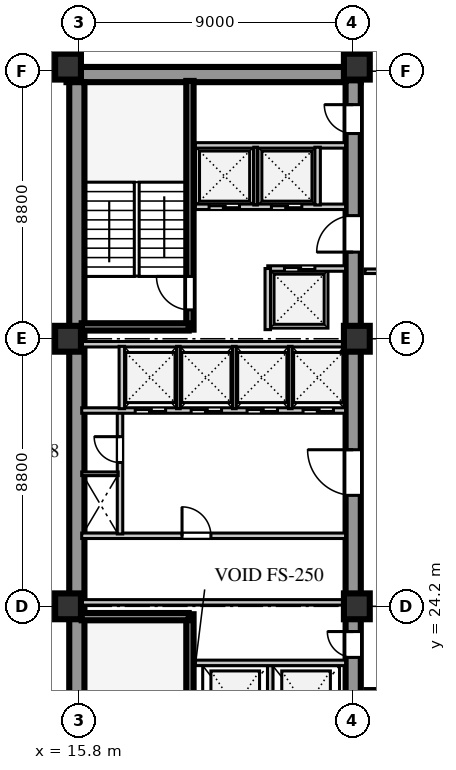
"""IFC4 building model, lengths in metres.
Left out: names, types, materials, properties, quantities, classifications, styles, units other than length and angle.
Written with IfcOpenShell. Run it as: python <this file> out.ifc"""

import sys

from ifc_helpers import new_model, si_unit, direction, frame, frame_2d, origin, origin_2d, place, context, subcontext, project, spatial, rectangle, extrude, element, fill, save


model = new_model("IFC4")
c1 = context("Model", 3, precision=1e-05, world=origin(), true_north=direction((0.0, 1.0)))
c2 = subcontext(c1, "Body", "Model", "MODEL_VIEW")
j1 = project(units=[si_unit("LENGTHUNIT", "METRE"), si_unit("PLANEANGLEUNIT", "RADIAN")], contexts=[c1])
p1 = place(None, origin())
s1 = spatial("IfcSite", under=j1, at=p1, CompositionType="ELEMENT")
p2 = place(p1, origin())
s2 = spatial("IfcBuilding", under=s1, at=p2, CompositionType="ELEMENT")
p3 = place(p2, frame((0.0, 0.0, 127.1)))
s3 = spatial("IfcBuildingStorey", under=s2, at=p3, CompositionType="ELEMENT", Elevation=127.1)
p4 = place(p3, frame((15.4, 41.69, 0.0), z_axis=(0.0, 0.0, 1.0), x_axis=(1.0, 0.0, 0.0)))
e1 = element("IfcWall", 1, at=p4, inside=s3, PredefinedType="SHEAR", context=c2, shape_type="SweptSolid", body=[
    extrude(rectangle(XDim=9.68, YDim=0.5, at=frame_2d((4.84, 0.0))), origin(), (0.0, 0.0, 1.0), 3.6),
])
p5 = place(p3, frame((15.74, 15.81, 0.0), z_axis=(0.0, 0.0, 1.0), x_axis=(0.0, 1.0, 0.0)))
e2 = element("IfcWall", 2, at=p5, inside=s3, PredefinedType="SHEAR", context=c2, shape_type="SweptSolid", body=[
    extrude(rectangle(XDim=25.63, YDim=0.5, at=frame_2d((12.815, 0.0))), origin(), (0.0, 0.0, 1.0), 3.6),
])
p6 = place(p3, frame((24.83, 15.74, 0.0), z_axis=(0.0, 0.0, 1.0), x_axis=(0.0, 1.0, 0.0)))
e3 = element("IfcWall", 3, at=p6, inside=s3, PredefinedType="SHEAR", context=c2, shape_type="SweptSolid", body=[
    extrude(rectangle(XDim=25.76, YDim=0.5, at=frame_2d((12.88, 0.0))), origin(), (0.0, 0.0, 1.0), 3.6),
])
p7 = place(p6, frame((1.61, 0.0, 0.0)))
e4 = element("IfcOpeningElement", 4, at=p7, cuts=e3, PredefinedType="OPENING", context=c2, shape_type="SweptSolid", body=[
    extrude(rectangle(XDim=1.2, YDim=2.1, at=frame_2d((0.6, 1.05))), frame((0.0, 0.26, 0.0), z_axis=(0.0, -1.0, 0.0), x_axis=(1.0, 0.0, 0.0)), (0.0, 0.0, 1.0), 0.52),
])
p8 = place(p6, frame((6.78, 0.0, 0.0)))
e5 = element("IfcOpeningElement", 5, at=p8, cuts=e3, PredefinedType="OPENING", context=c2, shape_type="SweptSolid", body=[
    extrude(rectangle(XDim=0.85, YDim=2.06, at=frame_2d((0.425, 1.03))), frame((0.0, 0.26, 0.0), z_axis=(0.0, -1.0, 0.0), x_axis=(1.0, 0.0, 0.0)), (0.0, 0.0, 1.0), 0.52),
])
p9 = place(p6, frame((12.11, 0.0, 0.0)))
e6 = element("IfcOpeningElement", 6, at=p9, cuts=e3, PredefinedType="OPENING", context=c2, shape_type="SweptSolid", body=[
    extrude(rectangle(XDim=1.5, YDim=2.12, at=frame_2d((0.75, 1.06))), frame((0.0, 0.26, 0.0), z_axis=(0.0, -1.0, 0.0), x_axis=(1.0, 0.0, 0.0)), (0.0, 0.0, 1.0), 0.52),
])
p10 = place(p6, frame((20.11, 0.0, 0.0)))
e7 = element("IfcOpeningElement", 7, at=p10, cuts=e3, PredefinedType="OPENING", context=c2, shape_type="SweptSolid", body=[
    extrude(rectangle(XDim=1.2, YDim=2.12, at=frame_2d((0.6, 1.06))), frame((0.0, 0.26, 0.0), z_axis=(0.0, -1.0, 0.0), x_axis=(1.0, 0.0, 0.0)), (0.0, 0.0, 1.0), 0.52),
])
p11 = place(p6, frame((24.01, 0.0, 0.0)))
e8 = element("IfcOpeningElement", 8, at=p11, cuts=e3, PredefinedType="OPENING", context=c2, shape_type="SweptSolid", body=[
    extrude(rectangle(XDim=0.95, YDim=2.1, at=frame_2d((0.475, 1.05))), frame((0.0, 0.26, 0.0), z_axis=(0.0, -1.0, 0.0), x_axis=(1.0, 0.0, 0.0)), (0.0, 0.0, 1.0), 0.52),
])
for number, where, z_axis, x_axis in (
    (9, (15.45, 24.2, 0.0), (0.0, 0.0, 1.0), (1.0, 0.0, 0.0)),
    (10, (15.45, 33.0, 0.0), (0.0, 0.0, 1.0), (1.0, 0.0, 0.0)),
    (11, (15.45, 41.95, 0.0), (0.0, 0.0, 1.0), (1.0, 0.0, 0.0)),
    (12, (24.95, 24.2, 0.0), (0.0, 0.0, 1.0), (1.0, 0.0, 0.0)),
    (13, (24.95, 33.0, 0.0), (0.0, 0.0, 1.0), (1.0, 0.0, 0.0)),
    (14, (24.95, 41.95, 0.0), (0.0, 0.0, 1.0), (1.0, 0.0, 0.0)),
):
    element("IfcColumn", number, at=place(p3, frame(where, z_axis=z_axis, x_axis=x_axis)), inside=s3, PredefinedType="COLUMN", context=c2, shape_type="SweptSolid", body=[
        extrude(rectangle(XDim=0.85, YDim=0.85, at=origin_2d()), origin(), (0.0, 0.0, 1.0), 3.6),
    ])
p12 = place(p3, frame((19.46, 15.74, 0.0), z_axis=(0.0, 0.0, 1.0), x_axis=(0.0, 1.0, 0.0)))
e15 = element("IfcWall", 15, at=p12, inside=s3, PredefinedType="SHEAR", context=c2, shape_type="SweptSolid", body=[
    extrude(rectangle(XDim=8.2, YDim=0.24, at=frame_2d((4.1, 0.0))), origin(), (0.0, 0.0, 1.0), 3.85),
])
p13 = place(p12, frame((0.45, 0.0, 0.0)))
e16 = element("IfcOpeningElement", 16, at=p13, cuts=e15, PredefinedType="OPENING", context=c2, shape_type="SweptSolid", body=[
    extrude(rectangle(XDim=1.1, YDim=2.1, at=frame_2d((0.55, 1.05))), frame((0.0, 0.13, 0.0), z_axis=(0.0, -1.0, 0.0), x_axis=(1.0, 0.0, 0.0)), (0.0, 0.0, 1.0), 0.26),
])
p14 = place(p3, frame((15.9, 23.86, 0.0), z_axis=(0.0, 0.0, 1.0), x_axis=(1.0, 0.0, 0.0)))
e17 = element("IfcWall", 17, at=p14, inside=s3, PredefinedType="SHEAR", context=c2, shape_type="SweptSolid", body=[
    extrude(rectangle(XDim=3.52, YDim=0.24, at=frame_2d((1.76, 0.0))), origin(), (0.0, 0.0, 1.0), 3.85),
])
p15 = place(p3, frame((22.1, 19.51, 0.0), z_axis=(0.0, 0.0, 1.0), x_axis=(0.0, 1.0, 0.0)))
e18 = element("IfcWall", 18, at=p15, inside=s3, PredefinedType="SOLIDWALL", context=c2, shape_type="SweptSolid", body=[
    extrude(rectangle(XDim=2.74, YDim=0.18, at=frame_2d((1.37, 0.0))), origin(), (0.0, 0.0, 1.0), 3.6),
])
p16 = place(p3, frame((19.64, 22.34, 0.0), z_axis=(0.0, 0.0, 1.0), x_axis=(1.0, 0.0, 0.0)))
e19 = element("IfcWall", 19, at=p16, inside=s3, PredefinedType="SOLIDWALL", context=c2, shape_type="SweptSolid", body=[
    extrude(rectangle(XDim=4.94, YDim=0.18, at=frame_2d((2.47, 0.0))), origin(), (0.0, 0.0, 1.0), 3.6),
])
p17 = place(p3, frame((15.9, 26.52, 0.0), z_axis=(0.0, 0.0, 1.0), x_axis=(1.0, 0.0, 0.0)))
e20 = element("IfcWall", 20, at=p17, inside=s3, PredefinedType="SOLIDWALL", context=c2, shape_type="SweptSolid", body=[
    extrude(rectangle(XDim=8.68, YDim=0.18, at=frame_2d((4.34, 0.0))), origin(), (0.0, 0.0, 1.0), 3.6),
])
p18 = place(p17, frame((3.3, 0.0, 0.0)))
e21 = element("IfcOpeningElement", 21, at=p18, cuts=e20, PredefinedType="OPENING", context=c2, shape_type="SweptSolid", body=[
    extrude(rectangle(XDim=0.95, YDim=2.1, at=frame_2d((0.475, 1.05))), frame((0.0, 0.1, 0.0), z_axis=(0.0, -1.0, 0.0), x_axis=(1.0, 0.0, 0.0)), (0.0, 0.0, 1.0), 0.2),
])
p19 = place(p3, frame((15.9, 24.33, 0.0), z_axis=(0.0, 0.0, 1.0), x_axis=(1.0, 0.0, 0.0)))
e22 = element("IfcWall", 22, at=p19, inside=s3, PredefinedType="SOLIDWALL", context=c2, shape_type="SweptSolid", body=[
    extrude(rectangle(XDim=8.68, YDim=0.18, at=frame_2d((4.34, 0.0))), origin(), (0.0, 0.0, 1.0), 2.95),
])
p20 = place(p3, frame((17.16, 26.58, 0.0), z_axis=(0.0, 0.0, 1.0), x_axis=(0.0, 1.0, 0.0)))
e23 = element("IfcWall", 23, at=p20, inside=s3, PredefinedType="SOLIDWALL", context=c2, shape_type="SweptSolid", body=[
    extrude(rectangle(XDim=4.02, YDim=0.18, at=frame_2d((2.01, 0.0))), origin(), (0.0, 0.0, 1.0), 3.6),
])
p21 = place(p20, frame((2.35, 0.0, 0.0)))
e24 = element("IfcOpeningElement", 24, at=p21, cuts=e23, PredefinedType="OPENING", context=c2, shape_type="SweptSolid", body=[
    extrude(rectangle(XDim=0.85, YDim=2.06, at=frame_2d((0.425, 1.03))), frame((0.0, 0.1, 0.0), z_axis=(0.0, -1.0, 0.0), x_axis=(1.0, 0.0, 0.0)), (0.0, 0.0, 1.0), 0.2),
])
p22 = place(p3, frame((15.9, 28.56, 0.0), z_axis=(0.0, 0.0, 1.0), x_axis=(1.0, 0.0, 0.0)))
e25 = element("IfcWall", 25, at=p22, inside=s3, PredefinedType="PARTITIONING", context=c2, shape_type="SweptSolid", body=[
    extrude(rectangle(XDim=1.2, YDim=0.12, at=frame_2d((0.6, 0.0))), origin(), (0.0, 0.0, 1.0), 3.6),
])
p23 = place(p3, frame((15.9, 30.64, 0.0), z_axis=(0.0, 0.0, 1.0), x_axis=(1.0, 0.0, 0.0)))
e26 = element("IfcWall", 26, at=p23, inside=s3, PredefinedType="SOLIDWALL", context=c2, shape_type="SweptSolid", body=[
    extrude(rectangle(XDim=8.68, YDim=0.18, at=frame_2d((4.34, 0.0))), origin(), (0.0, 0.0, 1.0), 3.6),
])
p24 = place(p23, frame((1.76, 0.0, 0.0)))
e27 = element("IfcOpeningElement", 27, at=p24, cuts=e26, PredefinedType="OPENING", context=c2, shape_type="SweptSolid", body=[
    extrude(rectangle(XDim=1.0, YDim=2.1, at=frame_2d((0.5, 1.05))), frame((0.0, 0.1, 0.0), z_axis=(0.0, -1.0, 0.0), x_axis=(1.0, 0.0, 0.0)), (0.0, 0.0, 1.0), 0.2),
])
p25 = place(p23, frame((3.6, 0.0, 0.0)))
e28 = element("IfcOpeningElement", 28, at=p25, cuts=e26, PredefinedType="OPENING", context=c2, shape_type="SweptSolid", body=[
    extrude(rectangle(XDim=1.0, YDim=2.1, at=frame_2d((0.5, 1.05))), frame((0.0, 0.1, 0.0), z_axis=(0.0, -1.0, 0.0), x_axis=(1.0, 0.0, 0.0)), (0.0, 0.0, 1.0), 0.2),
])
p26 = place(p23, frame((5.44, 0.0, 0.0)))
e29 = element("IfcOpeningElement", 29, at=p26, cuts=e26, PredefinedType="OPENING", context=c2, shape_type="SweptSolid", body=[
    extrude(rectangle(XDim=1.0, YDim=2.1, at=frame_2d((0.5, 1.05))), frame((0.0, 0.1, 0.0), z_axis=(0.0, -1.0, 0.0), x_axis=(1.0, 0.0, 0.0)), (0.0, 0.0, 1.0), 0.2),
])
p27 = place(p23, frame((7.28, 0.0, 0.0)))
e30 = element("IfcOpeningElement", 30, at=p27, cuts=e26, PredefinedType="OPENING", context=c2, shape_type="SweptSolid", body=[
    extrude(rectangle(XDim=1.0, YDim=2.1, at=frame_2d((0.5, 1.05))), frame((0.0, 0.1, 0.0), z_axis=(0.0, -1.0, 0.0), x_axis=(1.0, 0.0, 0.0)), (0.0, 0.0, 1.0), 0.2),
])
p28 = place(p3, frame((15.9, 32.82, 0.0), z_axis=(0.0, 0.0, 1.0), x_axis=(1.0, 0.0, 0.0)))
e31 = element("IfcWall", 31, at=p28, inside=s3, PredefinedType="SOLIDWALL", context=c2, shape_type="SweptSolid", body=[
    extrude(rectangle(XDim=8.68, YDim=0.18, at=frame_2d((4.34, 0.0))), origin(), (0.0, 0.0, 1.0), 2.95),
])
p29 = place(p3, frame((17.22, 30.7, 0.0), z_axis=(0.0, 0.0, 1.0), x_axis=(0.0, 1.0, 0.0)))
e32 = element("IfcWall", 32, at=p29, inside=s3, PredefinedType="SOLIDWALL", context=c2, shape_type="SweptSolid", body=[
    extrude(rectangle(XDim=2.05, YDim=0.18, at=frame_2d((1.025, 0.0))), origin(), (0.0, 0.0, 1.0), 3.6),
])
for number, where, z_axis, x_axis in (
    (33, (19.08, 30.7, 0.0), (0.0, 0.0, 1.0), (0.0, 1.0, 0.0)),
    (34, (20.92, 30.7, 0.0), (0.0, 0.0, 1.0), (0.0, 1.0, 0.0)),
    (35, (22.76, 30.7, 0.0), (0.0, 0.0, 1.0), (0.0, 1.0, 0.0)),
):
    element("IfcWall", number, at=place(p3, frame(where, z_axis=z_axis, x_axis=x_axis)), inside=s3, PredefinedType="PARTITIONING", context=c2, shape_type="SweptSolid", body=[
        extrude(rectangle(XDim=2.05, YDim=0.12, at=frame_2d((1.025, 0.0))), origin(), (0.0, 0.0, 1.0), 3.6),
    ])
p30 = place(p3, frame((19.46, 33.3, 0.0), z_axis=(0.0, 0.0, 1.0), x_axis=(0.0, 1.0, 0.0)))
e36 = element("IfcWall", 36, at=p30, inside=s3, PredefinedType="SHEAR", context=c2, shape_type="SweptSolid", body=[
    extrude(rectangle(XDim=8.18, YDim=0.24, at=frame_2d((4.09, 0.0))), origin(), (0.0, 0.0, 1.0), 3.85),
])
p31 = place(p30, frame((0.65, 0.0, 0.0)))
e37 = element("IfcOpeningElement", 37, at=p31, cuts=e36, PredefinedType="OPENING", context=c2, shape_type="SweptSolid", body=[
    extrude(rectangle(XDim=1.1, YDim=2.1, at=frame_2d((0.55, 1.05))), frame((0.0, 0.13, 0.0), z_axis=(0.0, -1.0, 0.0), x_axis=(1.0, 0.0, 0.0)), (0.0, 0.0, 1.0), 0.26),
])
p32 = place(p3, frame((15.9, 33.39, 0.0), z_axis=(0.0, 0.0, 1.0), x_axis=(1.0, 0.0, 0.0)))
e38 = element("IfcWall", 38, at=p32, inside=s3, PredefinedType="SHEAR", context=c2, shape_type="SweptSolid", body=[
    extrude(rectangle(XDim=3.52, YDim=0.24, at=frame_2d((1.76, 0.0))), origin(), (0.0, 0.0, 1.0), 3.85),
])
p33 = place(p3, frame((22.02, 35.31, 0.0), z_axis=(0.0, 0.0, 1.0), x_axis=(1.0, 0.0, 0.0)))
e39 = element("IfcWall", 39, at=p33, inside=s3, PredefinedType="SOLIDWALL", context=c2, shape_type="SweptSolid", body=[
    extrude(rectangle(XDim=2.56, YDim=0.18, at=frame_2d((1.28, 0.0))), origin(), (0.0, 0.0, 1.0), 3.6),
])
p34 = place(p33, frame((0.55, 0.0, 0.0)))
e40 = element("IfcOpeningElement", 40, at=p34, cuts=e39, PredefinedType="OPENING", context=c2, shape_type="SweptSolid", body=[
    extrude(rectangle(XDim=1.0, YDim=2.1, at=frame_2d((0.5, 1.05))), frame((0.0, 0.1, 0.0), z_axis=(0.0, -1.0, 0.0), x_axis=(1.0, 0.0, 0.0)), (0.0, 0.0, 1.0), 0.2),
])
p35 = place(p3, frame((22.02, 33.3, 0.0), z_axis=(0.0, 0.0, 1.0), x_axis=(0.0, 1.0, 0.0)))
e41 = element("IfcWall", 41, at=p35, inside=s3, PredefinedType="SOLIDWALL", context=c2, shape_type="SweptSolid", body=[
    extrude(rectangle(XDim=2.01, YDim=0.18, at=frame_2d((1.005, 0.0))), origin(), (0.0, 0.0, 1.0), 3.6),
])
p36 = place(p3, frame((19.64, 37.34, 0.0), z_axis=(0.0, 0.0, 1.0), x_axis=(1.0, 0.0, 0.0)))
e42 = element("IfcWall", 42, at=p36, inside=s3, PredefinedType="SOLIDWALL", context=c2, shape_type="SweptSolid", body=[
    extrude(rectangle(XDim=4.94, YDim=0.18, at=frame_2d((2.47, 0.0))), origin(), (0.0, 0.0, 1.0), 3.6),
])
p37 = place(p36, frame((0.45, 0.0, 0.0)))
e43 = element("IfcOpeningElement", 43, at=p37, cuts=e42, PredefinedType="OPENING", context=c2, shape_type="SweptSolid", body=[
    extrude(rectangle(XDim=1.0, YDim=2.1, at=frame_2d((0.5, 1.05))), frame((0.0, 0.1, 0.0), z_axis=(0.0, -1.0, 0.0), x_axis=(1.0, 0.0, 0.0)), (0.0, 0.0, 1.0), 0.2),
])
p38 = place(p36, frame((2.5, 0.0, 0.0)))
e44 = element("IfcOpeningElement", 44, at=p38, cuts=e42, PredefinedType="OPENING", context=c2, shape_type="SweptSolid", body=[
    extrude(rectangle(XDim=1.0, YDim=2.1, at=frame_2d((0.5, 1.05))), frame((0.0, 0.1, 0.0), z_axis=(0.0, -1.0, 0.0), x_axis=(1.0, 0.0, 0.0)), (0.0, 0.0, 1.0), 0.2),
])
p39 = place(p3, frame((19.64, 39.36, 0.0), z_axis=(0.0, 0.0, 1.0), x_axis=(1.0, 0.0, 0.0)))
e45 = element("IfcWall", 45, at=p39, inside=s3, PredefinedType="SOLIDWALL", context=c2, shape_type="SweptSolid", body=[
    extrude(rectangle(XDim=4.94, YDim=0.18, at=frame_2d((2.47, 0.0))), origin(), (0.0, 0.0, 1.0), 3.6),
])
p40 = place(p3, frame((21.62, 37.4, 0.0), z_axis=(0.0, 0.0, 1.0), x_axis=(0.0, 1.0, 0.0)))
e46 = element("IfcWall", 46, at=p40, inside=s3, PredefinedType="PARTITIONING", context=c2, shape_type="SweptSolid", body=[
    extrude(rectangle(XDim=1.9, YDim=0.12, at=frame_2d((0.95, 0.0))), origin(), (0.0, 0.0, 1.0), 3.6),
])
p41 = place(p3, frame((23.66, 37.4, 0.0), z_axis=(0.0, 0.0, 1.0), x_axis=(0.0, 1.0, 0.0)))
e47 = element("IfcWall", 47, at=p41, inside=s3, PredefinedType="SOLIDWALL", context=c2, shape_type="SweptSolid", body=[
    extrude(rectangle(XDim=1.9, YDim=0.18, at=frame_2d((0.95, 0.0))), origin(), (0.0, 0.0, 1.0), 3.6),
])
p42 = place(p3, frame((25.22, 21.42, 0.0), z_axis=(0.0, 0.0, 1.0), x_axis=(1.0, 0.0, 0.0)))
e48 = element("IfcWall", 48, at=p42, inside=s3, PredefinedType="PARTITIONING", context=c2, shape_type="SweptSolid", body=[
    extrude(rectangle(XDim=15.6, YDim=0.15, at=frame_2d((7.8, 0.0))), origin(), (0.0, 0.0, 1.0), 3.2),
])
p43 = place(p42, frame((0.73, 0.0, 0.0)))
e49 = element("IfcOpeningElement", 49, at=p43, cuts=e48, PredefinedType="OPENING", context=c2, shape_type="SweptSolid", body=[
    extrude(rectangle(XDim=0.95, YDim=2.1, at=frame_2d((0.475, 1.05))), frame((0.0, 0.085, 0.0), z_axis=(0.0, -1.0, 0.0), x_axis=(1.0, 0.0, 0.0)), (0.0, 0.0, 1.0), 0.17),
])
p44 = place(p42, frame((5.23, 0.0, 0.0)))
e50 = element("IfcOpeningElement", 50, at=p44, cuts=e48, PredefinedType="OPENING", context=c2, shape_type="SweptSolid", body=[
    extrude(rectangle(XDim=0.95, YDim=2.1, at=frame_2d((0.475, 1.05))), frame((0.0, 0.085, 0.0), z_axis=(0.0, -1.0, 0.0), x_axis=(1.0, 0.0, 0.0)), (0.0, 0.0, 1.0), 0.17),
])
p45 = place(p42, frame((10.83, 0.0, 0.0)))
e51 = element("IfcOpeningElement", 51, at=p45, cuts=e48, PredefinedType="OPENING", context=c2, shape_type="SweptSolid", body=[
    extrude(rectangle(XDim=0.95, YDim=2.1, at=frame_2d((0.475, 1.05))), frame((0.0, 0.085, 0.0), z_axis=(0.0, -1.0, 0.0), x_axis=(1.0, 0.0, 0.0)), (0.0, 0.0, 1.0), 0.17),
])
p46 = place(p3, frame((25.22, 35.22, 0.0), z_axis=(0.0, 0.0, 1.0), x_axis=(1.0, 0.0, 0.0)))
e52 = element("IfcWall", 52, at=p46, inside=s3, PredefinedType="PARTITIONING", context=c2, shape_type="SweptSolid", body=[
    extrude(rectangle(XDim=9.5, YDim=0.15, at=frame_2d((4.75, 0.0))), origin(), (0.0, 0.0, 1.0), 3.6),
])
p47 = place(p46, frame((0.65, 0.0, 0.0)))
e53 = element("IfcOpeningElement", 53, at=p47, cuts=e52, PredefinedType="OPENING", context=c2, shape_type="SweptSolid", body=[
    extrude(rectangle(XDim=0.95, YDim=2.1, at=frame_2d((0.475, 1.05))), frame((0.0, 0.085, 0.0), z_axis=(0.0, -1.0, 0.0), x_axis=(1.0, 0.0, 0.0)), (0.0, 0.0, 1.0), 0.17),
])
p48 = place(p46, frame((5.2, 0.0, 0.0)))
e54 = element("IfcOpeningElement", 54, at=p48, cuts=e52, PredefinedType="OPENING", context=c2, shape_type="SweptSolid", body=[
    extrude(rectangle(XDim=0.95, YDim=2.1, at=frame_2d((0.475, 1.05))), frame((0.0, 0.085, 0.0), z_axis=(0.0, -1.0, 0.0), x_axis=(1.0, 0.0, 0.0)), (0.0, 0.0, 1.0), 0.17),
])
p49 = place(p8, frame((0.85, 0.0, 0.0), z_axis=(0.0, 0.0, 1.0), x_axis=(-1.0, 0.0, 0.0)))
e55 = element("IfcDoor", 55, at=p49, inside=s3, OperationType="SINGLE_SWING_LEFT", PredefinedType="DOOR", context=c2, shape_type="SweptSolid", body=[
    extrude(rectangle(XDim=0.85, YDim=2.06, at=frame_2d((0.425, 1.03))), frame((0.0, 0.025, 0.0), z_axis=(0.0, -1.0, 0.0), x_axis=(1.0, 0.0, 0.0)), (0.0, 0.0, 1.0), 0.05),
])
fill(e5, e55)
p50 = place(p18, origin())
e56 = element("IfcDoor", 56, at=p50, inside=s3, OperationType="SINGLE_SWING_LEFT", PredefinedType="DOOR", context=c2, shape_type="SweptSolid", body=[
    extrude(rectangle(XDim=0.95, YDim=2.1, at=frame_2d((0.475, 1.05))), frame((0.0, 0.025, 0.0), z_axis=(0.0, -1.0, 0.0), x_axis=(1.0, 0.0, 0.0)), (0.0, 0.0, 1.0), 0.05),
])
fill(e21, e56)
p51 = place(p21, origin())
e57 = element("IfcDoor", 57, at=p51, inside=s3, OperationType="SINGLE_SWING_RIGHT", PredefinedType="DOOR", context=c2, shape_type="SweptSolid", body=[
    extrude(rectangle(XDim=0.85, YDim=2.06, at=frame_2d((0.425, 1.03))), frame((0.0, 0.025, 0.0), z_axis=(0.0, -1.0, 0.0), x_axis=(1.0, 0.0, 0.0)), (0.0, 0.0, 1.0), 0.05),
])
fill(e24, e57)
p52 = place(p9, frame((1.5, 0.0, 0.0), z_axis=(0.0, 0.0, 1.0), x_axis=(-1.0, 0.0, 0.0)))
e58 = element("IfcDoor", 58, at=p52, inside=s3, OperationType="SINGLE_SWING_LEFT", PredefinedType="DOOR", context=c2, shape_type="SweptSolid", body=[
    extrude(rectangle(XDim=1.5, YDim=2.12, at=frame_2d((0.75, 1.06))), frame((0.0, 0.025, 0.0), z_axis=(0.0, -1.0, 0.0), x_axis=(1.0, 0.0, 0.0)), (0.0, 0.0, 1.0), 0.05),
])
fill(e6, e58)
p53 = place(p24, frame((1.0, 0.0, 0.0), z_axis=(0.0, 0.0, 1.0), x_axis=(-1.0, 0.0, 0.0)))
e59 = element("IfcDoor", 59, at=p53, inside=s3, OperationType="DOUBLE_DOOR_SLIDING", PredefinedType="DOOR", context=c2, shape_type="SweptSolid", body=[
    extrude(rectangle(XDim=1.0, YDim=2.1, at=frame_2d((0.5, 1.05))), frame((0.0, 0.025, 0.0), z_axis=(0.0, -1.0, 0.0), x_axis=(1.0, 0.0, 0.0)), (0.0, 0.0, 1.0), 0.05),
])
fill(e27, e59)
p54 = place(p25, frame((1.0, 0.0, 0.0), z_axis=(0.0, 0.0, 1.0), x_axis=(-1.0, 0.0, 0.0)))
e60 = element("IfcDoor", 60, at=p54, inside=s3, OperationType="DOUBLE_DOOR_SLIDING", PredefinedType="DOOR", context=c2, shape_type="SweptSolid", body=[
    extrude(rectangle(XDim=1.0, YDim=2.1, at=frame_2d((0.5, 1.05))), frame((0.0, 0.025, 0.0), z_axis=(0.0, -1.0, 0.0), x_axis=(1.0, 0.0, 0.0)), (0.0, 0.0, 1.0), 0.05),
])
fill(e28, e60)
p55 = place(p26, frame((1.0, 0.0, 0.0), z_axis=(0.0, 0.0, 1.0), x_axis=(-1.0, 0.0, 0.0)))
e61 = element("IfcDoor", 61, at=p55, inside=s3, OperationType="DOUBLE_DOOR_SLIDING", PredefinedType="DOOR", context=c2, shape_type="SweptSolid", body=[
    extrude(rectangle(XDim=1.0, YDim=2.1, at=frame_2d((0.5, 1.05))), frame((0.0, 0.025, 0.0), z_axis=(0.0, -1.0, 0.0), x_axis=(1.0, 0.0, 0.0)), (0.0, 0.0, 1.0), 0.05),
])
fill(e29, e61)
p56 = place(p27, frame((1.0, 0.0, 0.0), z_axis=(0.0, 0.0, 1.0), x_axis=(-1.0, 0.0, 0.0)))
e62 = element("IfcDoor", 62, at=p56, inside=s3, OperationType="DOUBLE_DOOR_SLIDING", PredefinedType="DOOR", context=c2, shape_type="SweptSolid", body=[
    extrude(rectangle(XDim=1.0, YDim=2.1, at=frame_2d((0.5, 1.05))), frame((0.0, 0.025, 0.0), z_axis=(0.0, -1.0, 0.0), x_axis=(1.0, 0.0, 0.0)), (0.0, 0.0, 1.0), 0.05),
])
fill(e30, e62)
p57 = place(p31, origin())
e63 = element("IfcDoor", 63, at=p57, inside=s3, OperationType="SINGLE_SWING_RIGHT", PredefinedType="DOOR", context=c2, shape_type="SweptSolid", body=[
    extrude(rectangle(XDim=1.1, YDim=2.1, at=frame_2d((0.55, 1.05))), frame((0.0, 0.025, 0.0), z_axis=(0.0, -1.0, 0.0), x_axis=(1.0, 0.0, 0.0)), (0.0, 0.0, 1.0), 0.05),
])
fill(e37, e63)
p58 = place(p10, frame((1.2, 0.0, 0.0), z_axis=(0.0, 0.0, 1.0), x_axis=(-1.0, 0.0, 0.0)))
e64 = element("IfcDoor", 64, at=p58, inside=s3, OperationType="SINGLE_SWING_RIGHT", PredefinedType="DOOR", context=c2, shape_type="SweptSolid", body=[
    extrude(rectangle(XDim=1.2, YDim=2.12, at=frame_2d((0.6, 1.06))), frame((0.0, 0.025, 0.0), z_axis=(0.0, -1.0, 0.0), x_axis=(1.0, 0.0, 0.0)), (0.0, 0.0, 1.0), 0.05),
])
fill(e7, e64)
p59 = place(p37, frame((1.0, 0.0, 0.0), z_axis=(0.0, 0.0, 1.0), x_axis=(-1.0, 0.0, 0.0)))
e65 = element("IfcDoor", 65, at=p59, inside=s3, OperationType="DOUBLE_DOOR_SLIDING", PredefinedType="DOOR", context=c2, shape_type="SweptSolid", body=[
    extrude(rectangle(XDim=1.0, YDim=2.1, at=frame_2d((0.5, 1.05))), frame((0.0, 0.025, 0.0), z_axis=(0.0, -1.0, 0.0), x_axis=(1.0, 0.0, 0.0)), (0.0, 0.0, 1.0), 0.05),
])
fill(e43, e65)
p60 = place(p38, frame((1.0, 0.0, 0.0), z_axis=(0.0, 0.0, 1.0), x_axis=(-1.0, 0.0, 0.0)))
e66 = element("IfcDoor", 66, at=p60, inside=s3, OperationType="DOUBLE_DOOR_SLIDING", PredefinedType="DOOR", context=c2, shape_type="SweptSolid", body=[
    extrude(rectangle(XDim=1.0, YDim=2.1, at=frame_2d((0.5, 1.05))), frame((0.0, 0.025, 0.0), z_axis=(0.0, -1.0, 0.0), x_axis=(1.0, 0.0, 0.0)), (0.0, 0.0, 1.0), 0.05),
])
fill(e44, e66)
p61 = place(p34, origin())
e67 = element("IfcDoor", 67, at=p61, inside=s3, OperationType="DOUBLE_DOOR_SLIDING", PredefinedType="DOOR", context=c2, shape_type="SweptSolid", body=[
    extrude(rectangle(XDim=1.0, YDim=2.1, at=frame_2d((0.5, 1.05))), frame((0.0, 0.025, 0.0), z_axis=(0.0, -1.0, 0.0), x_axis=(1.0, 0.0, 0.0)), (0.0, 0.0, 1.0), 0.05),
])
fill(e40, e67)
p62 = place(p11, frame((0.95, 0.0, 0.0), z_axis=(0.0, 0.0, 1.0), x_axis=(-1.0, 0.0, 0.0)))
e68 = element("IfcDoor", 68, at=p62, inside=s3, OperationType="SINGLE_SWING_LEFT", PredefinedType="DOOR", context=c2, shape_type="SweptSolid", body=[
    extrude(rectangle(XDim=0.95, YDim=2.1, at=frame_2d((0.475, 1.05))), frame((0.0, 0.025, 0.0), z_axis=(0.0, -1.0, 0.0), x_axis=(1.0, 0.0, 0.0)), (0.0, 0.0, 1.0), 0.05),
])
fill(e8, e68)
save(model, sys.argv[1])
